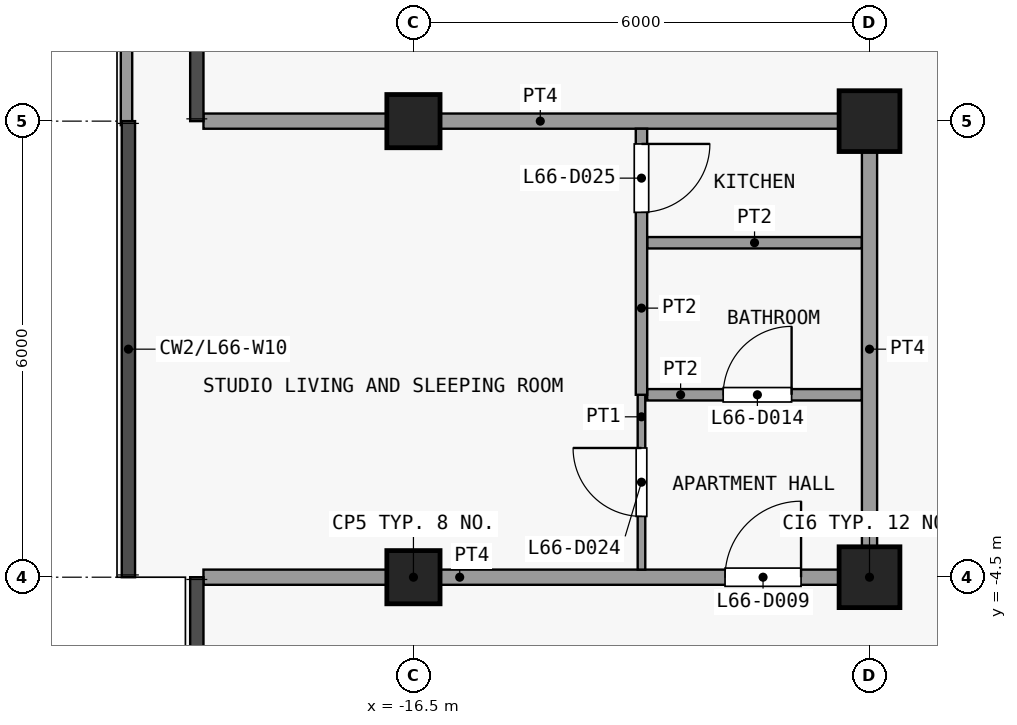
"""IFC4 building model, lengths in metres.
Left out: names, types, materials, properties, quantities, classifications, styles, units other than length and angle.
Written with IfcOpenShell. Run it as: python <this file> out.ifc"""

import sys

from ifc_helpers import new_model, si_unit, direction, frame, frame_2d, origin, origin_2d, place, context, subcontext, project, spatial, rectangle, extrude, element, fill, save


model = new_model("IFC4")
c1 = context("Model", 3, precision=1e-05, world=origin(), true_north=direction((0.0, 1.0)))
c2 = subcontext(c1, "Body", "Model", "MODEL_VIEW")
j1 = project(units=[si_unit("LENGTHUNIT", "METRE"), si_unit("PLANEANGLEUNIT", "RADIAN")], contexts=[c1])
p1 = place(None, origin())
s1 = spatial("IfcSite", under=j1, at=p1, CompositionType="ELEMENT")
p2 = place(p1, origin())
s2 = spatial("IfcBuilding", under=s1, at=p2, CompositionType="ELEMENT")
p3 = place(p2, frame((0.0, 0.0, 262.7)))
s3 = spatial("IfcBuildingStorey", under=s2, at=p3, CompositionType="ELEMENT", Elevation=262.7)
for number, where, z_axis, x_axis in (
    (1, (-16.5, -4.5, 0.0), (0.0, 0.0, 1.0), (1.0, 0.0, 0.0)),
    (2, (-16.5, 1.5, 0.0), (0.0, 0.0, 1.0), (1.0, 0.0, 0.0)),
):
    element("IfcColumn", number, at=place(p3, frame(where, z_axis=z_axis, x_axis=x_axis)), inside=s3, PredefinedType="COLUMN", context=c2, shape_type="SweptSolid", body=[
        extrude(rectangle(XDim=0.7, YDim=0.7, at=origin_2d()), origin(), (0.0, 0.0, 1.0), 3.6),
    ])
for number, where, z_axis, x_axis in (
    (3, (-10.5, -4.5, 0.0), (0.0, 0.0, 1.0), (1.0, 0.0, 0.0)),
    (4, (-10.5, 1.5, 0.0), (0.0, 0.0, 1.0), (1.0, 0.0, 0.0)),
):
    element("IfcColumn", number, at=place(p3, frame(where, z_axis=z_axis, x_axis=x_axis)), inside=s3, PredefinedType="COLUMN", context=c2, shape_type="SweptSolid", body=[
        extrude(rectangle(XDim=0.8, YDim=0.8, at=origin_2d()), origin(), (0.0, 0.0, 1.0), 3.6),
    ])
p4 = place(p3, frame((-20.275, 1.448, 0.0), z_axis=(0.0, 0.0, 1.0), x_axis=(0.0, 1.0, 0.0)))
e5 = element("IfcWall", 5, at=p4, inside=s3, PredefinedType="PARAPET", context=c2, shape_type="SweptSolid", body=[
    extrude(rectangle(XDim=6.002, YDim=0.15, at=frame_2d((3.001, 0.0))), origin(), (0.0, 0.0, 1.0), 1.15),
])
p5 = place(p3, frame((-19.262, -4.5, 0.0), z_axis=(0.0, 0.0, 1.0), x_axis=(1.0, 0.0, 0.0)))
e6 = element("IfcWall", 6, at=p5, inside=s3, PredefinedType="PARTITIONING", context=c2, shape_type="SweptSolid", body=[
    extrude(rectangle(XDim=8.863, YDim=0.2, at=frame_2d((4.431, 0.0))), origin(), (0.0, 0.0, 1.0), 3.3),
])
p6 = place(p5, frame((6.862, 0.0, 0.0)))
e7 = element("IfcOpeningElement", 7, at=p6, cuts=e6, PredefinedType="OPENING", context=c2, shape_type="SweptSolid", body=[
    extrude(rectangle(XDim=1.0, YDim=2.1, at=frame_2d((0.5, 1.05))), frame((0.0, 0.11, 0.0), z_axis=(0.0, -1.0, 0.0), x_axis=(1.0, 0.0, 0.0)), (0.0, 0.0, 1.0), 0.22),
])
p7 = place(p3, frame((-13.425, -2.1, 0.0), z_axis=(0.0, 0.0, 1.0), x_axis=(1.0, 0.0, 0.0)))
e8 = element("IfcWall", 8, at=p7, inside=s3, PredefinedType="PARTITIONING", context=c2, shape_type="SweptSolid", body=[
    extrude(rectangle(XDim=2.825, YDim=0.15, at=frame_2d((1.413, 0.0))), origin(), (0.0, 0.0, 1.0), 3.3),
])
p8 = place(p7, frame((1.0, 0.0, 0.0)))
e9 = element("IfcOpeningElement", 9, at=p8, cuts=e8, PredefinedType="OPENING", context=c2, shape_type="SweptSolid", body=[
    extrude(rectangle(XDim=0.9, YDim=2.1, at=frame_2d((0.45, 1.05))), frame((0.0, 0.085, 0.0), z_axis=(0.0, -1.0, 0.0), x_axis=(1.0, 0.0, 0.0)), (0.0, 0.0, 1.0), 0.17),
])
p9 = place(p3, frame((-13.425, -0.1, 0.0), z_axis=(0.0, 0.0, 1.0), x_axis=(1.0, 0.0, 0.0)))
e10 = element("IfcWall", 10, at=p9, inside=s3, PredefinedType="PARTITIONING", context=c2, shape_type="SweptSolid", body=[
    extrude(rectangle(XDim=2.825, YDim=0.15, at=frame_2d((1.413, 0.0))), origin(), (0.0, 0.0, 1.0), 3.3),
])
p10 = place(p3, frame((-19.262, 1.5, 0.0), z_axis=(0.0, 0.0, 1.0), x_axis=(1.0, 0.0, 0.0)))
e11 = element("IfcWall", 11, at=p10, inside=s3, PredefinedType="PARTITIONING", context=c2, shape_type="SweptSolid", body=[
    extrude(rectangle(XDim=8.863, YDim=0.2, at=frame_2d((4.431, 0.0))), origin(), (0.0, 0.0, 1.0), 3.3),
])
p11 = place(p3, frame((-13.5, -4.4, 0.0), z_axis=(0.0, 0.0, 1.0), x_axis=(0.0, 1.0, 0.0)))
e12 = element("IfcWall", 12, at=p11, inside=s3, PredefinedType="PARTITIONING", context=c2, shape_type="SweptSolid", body=[
    extrude(rectangle(XDim=2.3, YDim=0.1, at=frame_2d((1.15, 0.0))), origin(), (0.0, 0.0, 1.0), 3.3),
])
p12 = place(p11, frame((0.7, 0.0, 0.0)))
e13 = element("IfcOpeningElement", 13, at=p12, cuts=e12, PredefinedType="OPENING", context=c2, shape_type="SweptSolid", body=[
    extrude(rectangle(XDim=0.9, YDim=2.1, at=frame_2d((0.45, 1.05))), frame((0.0, 0.06, 0.0), z_axis=(0.0, -1.0, 0.0), x_axis=(1.0, 0.0, 0.0)), (0.0, 0.0, 1.0), 0.12),
])
p13 = place(p3, frame((-13.5, -2.1, 0.0), z_axis=(0.0, 0.0, 1.0), x_axis=(0.0, 1.0, 0.0)))
e14 = element("IfcWall", 14, at=p13, inside=s3, PredefinedType="PARTITIONING", context=c2, shape_type="SweptSolid", body=[
    extrude(rectangle(XDim=3.5, YDim=0.15, at=frame_2d((1.75, 0.0))), origin(), (0.0, 0.0, 1.0), 3.3),
])
p14 = place(p13, frame((2.4, 0.0, 0.0)))
e15 = element("IfcOpeningElement", 15, at=p14, cuts=e14, PredefinedType="OPENING", context=c2, shape_type="SweptSolid", body=[
    extrude(rectangle(XDim=0.9, YDim=2.1, at=frame_2d((0.45, 1.05))), frame((0.0, 0.085, 0.0), z_axis=(0.0, -1.0, 0.0), x_axis=(1.0, 0.0, 0.0)), (0.0, 0.0, 1.0), 0.17),
])
p15 = place(p3, frame((-10.5, -4.4, 0.0), z_axis=(0.0, 0.0, 1.0), x_axis=(0.0, 1.0, 0.0)))
e16 = element("IfcWall", 16, at=p15, inside=s3, PredefinedType="PARTITIONING", context=c2, shape_type="SweptSolid", body=[
    extrude(rectangle(XDim=5.8, YDim=0.2, at=frame_2d((2.9, 0.0))), origin(), (0.0, 0.0, 1.0), 3.3),
])
p16 = place(p6, origin())
e17 = element("IfcDoor", 17, at=p16, inside=s3, OperationType="SINGLE_SWING_LEFT", PredefinedType="DOOR", context=c2, shape_type="SweptSolid", body=[
    extrude(rectangle(XDim=1.0, YDim=2.1, at=frame_2d((0.5, 1.05))), frame((0.0, 0.025, 0.0), z_axis=(0.0, -1.0, 0.0), x_axis=(1.0, 0.0, 0.0)), (0.0, 0.0, 1.0), 0.05),
])
fill(e7, e17)
p17 = place(p8, origin())
e18 = element("IfcDoor", 18, at=p17, inside=s3, OperationType="SINGLE_SWING_LEFT", PredefinedType="DOOR", context=c2, shape_type="SweptSolid", body=[
    extrude(rectangle(XDim=0.9, YDim=2.1, at=frame_2d((0.45, 1.05))), frame((0.0, 0.025, 0.0), z_axis=(0.0, -1.0, 0.0), x_axis=(1.0, 0.0, 0.0)), (0.0, 0.0, 1.0), 0.05),
])
fill(e9, e18)
p18 = place(p12, origin())
e19 = element("IfcDoor", 19, at=p18, inside=s3, OperationType="SINGLE_SWING_LEFT", PredefinedType="DOOR", context=c2, shape_type="SweptSolid", body=[
    extrude(rectangle(XDim=0.9, YDim=2.1, at=frame_2d((0.45, 1.05))), frame((0.0, 0.025, 0.0), z_axis=(0.0, -1.0, 0.0), x_axis=(1.0, 0.0, 0.0)), (0.0, 0.0, 1.0), 0.05),
])
fill(e13, e19)
p19 = place(p14, origin())
e20 = element("IfcDoor", 20, at=p19, inside=s3, OperationType="SINGLE_SWING_RIGHT", PredefinedType="DOOR", context=c2, shape_type="SweptSolid", body=[
    extrude(rectangle(XDim=0.9, YDim=2.1, at=frame_2d((0.45, 1.05))), frame((0.0, 0.025, 0.0), z_axis=(0.0, -1.0, 0.0), x_axis=(1.0, 0.0, 0.0)), (0.0, 0.0, 1.0), 0.05),
])
fill(e15, e20)
save(model, sys.argv[1])
